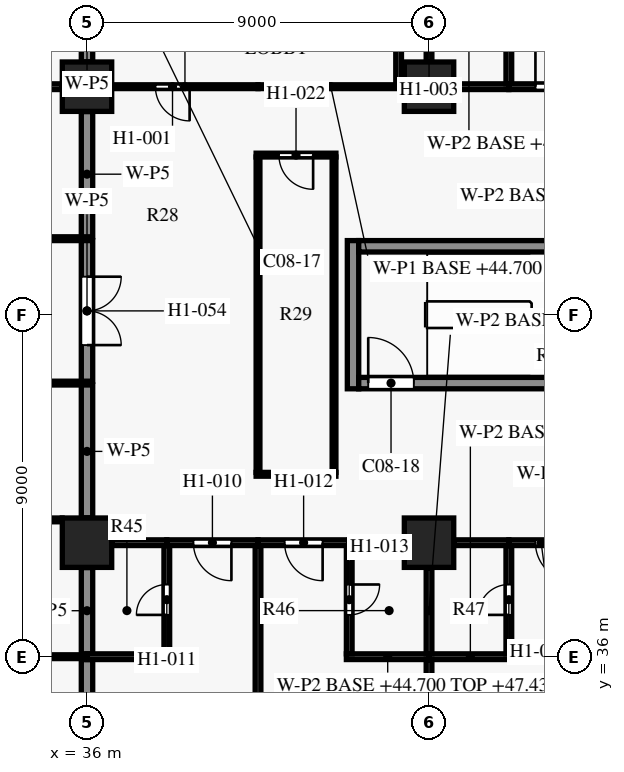
"""IFC4 building model, lengths in metres.
Left out: names, types, materials, properties, quantities, classifications, styles, units other than length and angle.
Written with IfcOpenShell. Run it as: python <this file> out.ifc"""

import sys

from ifc_helpers import new_model, si_unit, direction, frame, frame_2d, origin, origin_2d, place, context, subcontext, project, spatial, rectangle, extrude, element, fill, save


model = new_model("IFC4")
c1 = context("Model", 3, precision=1e-05, world=origin(), true_north=direction((0.0, 1.0)))
c2 = subcontext(c1, "Body", "Model", "MODEL_VIEW")
j1 = project(units=[si_unit("LENGTHUNIT", "METRE"), si_unit("PLANEANGLEUNIT", "RADIAN")], contexts=[c1])
p1 = place(None, origin())
s1 = spatial("IfcSite", under=j1, at=p1, CompositionType="ELEMENT")
p2 = place(p1, origin())
s2 = spatial("IfcBuilding", under=s1, at=p2, CompositionType="ELEMENT")
p3 = place(p2, frame((0.0, 0.0, 44.7)))
s3 = spatial("IfcBuildingStorey", under=s2, at=p3, CompositionType="ELEMENT", Elevation=44.7)
for number, where, z_axis, x_axis in (
    (1, (36.0, 39.0, 0.0), (0.0, 0.0, 1.0), (1.0, 0.0, 0.0)),
    (2, (36.0, 51.0, 0.0), (0.0, 0.0, 1.0), (1.0, 0.0, 0.0)),
    (3, (45.0, 39.0, 0.0), (0.0, 0.0, 1.0), (1.0, 0.0, 0.0)),
    (4, (45.0, 51.0, 0.0), (0.0, 0.0, 1.0), (1.0, 0.0, 0.0)),
):
    element("IfcColumn", number, at=place(p3, frame(where, z_axis=z_axis, x_axis=x_axis)), inside=s3, PredefinedType="COLUMN", context=c2, shape_type="SweptSolid", body=[
        extrude(rectangle(XDim=1.3, YDim=1.3, at=origin_2d()), origin(), (0.0, 0.0, 1.0), 3.6),
    ])
p4 = place(p3, frame((43.15, 43.2, 0.0), z_axis=(0.0, 0.0, 1.0), x_axis=(1.0, 0.0, 0.0)))
e5 = element("IfcWall", 5, at=p4, inside=s3, PredefinedType="SHEAR", context=c2, shape_type="SweptSolid", body=[
    extrude(rectangle(XDim=7.7, YDim=0.3, at=frame_2d((3.85, 0.0))), origin(), (0.0, 0.0, 1.0), 3.3),
])
p5 = place(p4, frame((0.25, 0.0, 0.0)))
e6 = element("IfcOpeningElement", 6, at=p5, cuts=e5, PredefinedType="OPENING", context=c2, shape_type="SweptSolid", body=[
    extrude(rectangle(XDim=1.2, YDim=2.2, at=frame_2d((0.6, 1.1))), frame((0.0, 0.16, 0.0), z_axis=(0.0, -1.0, 0.0), x_axis=(1.0, 0.0, 0.0)), (0.0, 0.0, 1.0), 0.32),
])
p6 = place(p3, frame((43.15, 46.8, 0.0), z_axis=(0.0, 0.0, 1.0), x_axis=(1.0, 0.0, 0.0)))
e7 = element("IfcWall", 7, at=p6, inside=s3, PredefinedType="SHEAR", context=c2, shape_type="SweptSolid", body=[
    extrude(rectangle(XDim=7.7, YDim=0.3, at=frame_2d((3.85, 0.0))), origin(), (0.0, 0.0, 1.0), 3.3),
])
p7 = place(p3, frame((43.0, 43.05, 0.0), z_axis=(0.0, 0.0, 1.0), x_axis=(0.0, 1.0, 0.0)))
e8 = element("IfcWall", 8, at=p7, inside=s3, PredefinedType="SHEAR", context=c2, shape_type="SweptSolid", body=[
    extrude(rectangle(XDim=3.9, YDim=0.3, at=frame_2d((1.95, 0.0))), origin(), (0.0, 0.0, 1.0), 3.3),
])
p8 = place(p3, frame((36.0, 35.925, 0.0), z_axis=(0.0, 0.0, 1.0), x_axis=(0.0, -1.0, 0.0)))
e9 = element("IfcWall", 9, at=p8, inside=s3, PredefinedType="PARTITIONING", context=c2, shape_type="SweptSolid", body=[
    extrude(rectangle(XDim=7.9, YDim=0.3, at=frame_2d((3.95, 0.0))), origin(), (0.0, 0.0, 1.0), 2.58),
])
p9 = place(p3, frame((45.0, 35.925, 0.0), z_axis=(0.0, 0.0, 1.0), x_axis=(0.0, -1.0, 0.0)))
e10 = element("IfcWall", 10, at=p9, inside=s3, PredefinedType="PARTITIONING", context=c2, shape_type="SweptSolid", body=[
    extrude(rectangle(XDim=8.8, YDim=0.15, at=frame_2d((4.4, 0.0))), origin(), (0.0, 0.0, 1.0), 2.73),
])
p10 = place(p3, frame((36.0, 36.0, 0.0), z_axis=(0.0, 0.0, 1.0), x_axis=(-1.0, 0.0, 0.0)))
e11 = element("IfcWall", 11, at=p10, inside=s3, PredefinedType="PARTITIONING", context=c2, shape_type="SweptSolid", body=[
    extrude(rectangle(XDim=6.55, YDim=0.1, at=frame_2d((3.275, 0.0))), origin(), (0.0, 0.0, 1.0), 2.58),
])
p11 = place(p3, frame((36.0, 36.0, 0.0), z_axis=(0.0, 0.0, 1.0), x_axis=(1.0, 0.0, 0.0)))
e12 = element("IfcWall", 12, at=p11, inside=s3, PredefinedType="PARTITIONING", context=c2, shape_type="SweptSolid", body=[
    extrude(rectangle(XDim=2.175, YDim=0.15, at=frame_2d((1.087, 0.0))), origin(), (0.0, 0.0, 1.0), 2.58),
])
for number, where, z_axis, x_axis in (
    (13, (42.825, 36.0, 0.0), (0.0, 0.0, 1.0), (1.0, 0.0, 0.0)),
    (14, (45.0, 36.0, 0.0), (0.0, 0.0, 1.0), (1.0, 0.0, 0.0)),
):
    element("IfcWall", number, at=place(p3, frame(where, z_axis=z_axis, x_axis=x_axis)), inside=s3, PredefinedType="PARTITIONING", context=c2, shape_type="SweptSolid", body=[
        extrude(rectangle(XDim=2.175, YDim=0.15, at=frame_2d((1.087, 0.0))), origin(), (0.0, 0.0, 1.0), 2.73),
    ])
p12 = place(p3, frame((38.1, 36.075, 0.0), z_axis=(0.0, 0.0, 1.0), x_axis=(0.0, 1.0, 0.0)))
e15 = element("IfcWall", 15, at=p12, inside=s3, PredefinedType="PARTITIONING", context=c2, shape_type="SweptSolid", body=[
    extrude(rectangle(XDim=2.85, YDim=0.15, at=frame_2d((1.425, 0.0))), origin(), (0.0, 0.0, 1.0), 2.58),
])
p13 = place(p12, frame((1.025, 0.0, 0.0)))
e16 = element("IfcOpeningElement", 16, at=p13, cuts=e15, PredefinedType="OPENING", context=c2, shape_type="SweptSolid", body=[
    extrude(rectangle(XDim=0.8, YDim=2.1, at=frame_2d((0.4, 1.05))), frame((0.0, 0.085, 0.0), z_axis=(0.0, -1.0, 0.0), x_axis=(1.0, 0.0, 0.0)), (0.0, 0.0, 1.0), 0.17),
])
p14 = place(p3, frame((47.1, 36.075, 0.0), z_axis=(0.0, 0.0, 1.0), x_axis=(0.0, 1.0, 0.0)))
e17 = element("IfcWall", 17, at=p14, inside=s3, PredefinedType="PARTITIONING", context=c2, shape_type="SweptSolid", body=[
    extrude(rectangle(XDim=2.85, YDim=0.15, at=frame_2d((1.425, 0.0))), origin(), (0.0, 0.0, 1.0), 2.58),
])
p15 = place(p14, frame((1.025, 0.0, 0.0)))
e18 = element("IfcOpeningElement", 18, at=p15, cuts=e17, PredefinedType="OPENING", context=c2, shape_type="SweptSolid", body=[
    extrude(rectangle(XDim=0.8, YDim=2.1, at=frame_2d((0.4, 1.05))), frame((0.0, 0.085, 0.0), z_axis=(0.0, -1.0, 0.0), x_axis=(1.0, 0.0, 0.0)), (0.0, 0.0, 1.0), 0.17),
])
p16 = place(p3, frame((36.0, 38.345, 0.0), z_axis=(0.0, 0.0, 1.0), x_axis=(0.0, -1.0, 0.0)))
e19 = element("IfcWall", 19, at=p16, inside=s3, PredefinedType="PARTITIONING", context=c2, shape_type="SweptSolid", body=[
    extrude(rectangle(XDim=2.27, YDim=0.3, at=frame_2d((1.135, 0.0))), origin(), (0.0, 0.0, 1.0), 2.58),
])
p17 = place(p3, frame((45.0, 38.345, 0.0), z_axis=(0.0, 0.0, 1.0), x_axis=(0.0, -1.0, 0.0)))
e20 = element("IfcWall", 20, at=p17, inside=s3, PredefinedType="PARTITIONING", context=c2, shape_type="SweptSolid", body=[
    extrude(rectangle(XDim=2.27, YDim=0.15, at=frame_2d((1.135, 0.0))), origin(), (0.0, 0.0, 1.0), 2.73),
])
p18 = place(p3, frame((40.5, 38.925, 0.0), z_axis=(0.0, 0.0, 1.0), x_axis=(0.0, -1.0, 0.0)))
e21 = element("IfcWall", 21, at=p18, inside=s3, PredefinedType="PARTITIONING", context=c2, shape_type="SweptSolid", body=[
    extrude(rectangle(XDim=11.35, YDim=0.15, at=frame_2d((5.675, 0.0))), origin(), (0.0, 0.0, 1.0), 2.58),
])
p19 = place(p3, frame((42.9, 38.925, 0.0), z_axis=(0.0, 0.0, 1.0), x_axis=(0.0, -1.0, 0.0)))
e22 = element("IfcWall", 22, at=p19, inside=s3, PredefinedType="PARTITIONING", context=c2, shape_type="SweptSolid", body=[
    extrude(rectangle(XDim=2.85, YDim=0.15, at=frame_2d((1.425, 0.0))), origin(), (0.0, 0.0, 1.0), 2.58),
])
p20 = place(p19, frame((1.025, 0.0, 0.0)))
e23 = element("IfcOpeningElement", 23, at=p20, cuts=e22, PredefinedType="OPENING", context=c2, shape_type="SweptSolid", body=[
    extrude(rectangle(XDim=0.8, YDim=2.1, at=frame_2d((0.4, 1.05))), frame((0.0, 0.085, 0.0), z_axis=(0.0, -1.0, 0.0), x_axis=(1.0, 0.0, 0.0)), (0.0, 0.0, 1.0), 0.17),
])
p21 = place(p3, frame((38.1, 39.0, 0.0), z_axis=(0.0, 0.0, 1.0), x_axis=(-1.0, 0.0, 0.0)))
e24 = element("IfcWall", 24, at=p21, inside=s3, PredefinedType="PARTITIONING", context=c2, shape_type="SweptSolid", body=[
    extrude(rectangle(XDim=1.445, YDim=0.15, at=frame_2d((0.723, 0.0))), origin(), (0.0, 0.0, 1.0), 2.58),
])
p22 = place(p3, frame((40.5, 39.0, 0.0), z_axis=(0.0, 0.0, 1.0), x_axis=(-1.0, 0.0, 0.0)))
e25 = element("IfcWall", 25, at=p22, inside=s3, PredefinedType="PARTITIONING", context=c2, shape_type="SweptSolid", body=[
    extrude(rectangle(XDim=2.4, YDim=0.15, at=frame_2d((1.2, 0.0))), origin(), (0.0, 0.0, 1.0), 2.58),
])
p23 = place(p22, frame((0.7, 0.0, 0.0)))
e26 = element("IfcOpeningElement", 26, at=p23, cuts=e25, PredefinedType="OPENING", context=c2, shape_type="SweptSolid", body=[
    extrude(rectangle(XDim=1.0, YDim=2.1, at=frame_2d((0.5, 1.05))), frame((0.0, 0.085, 0.0), z_axis=(0.0, -1.0, 0.0), x_axis=(1.0, 0.0, 0.0)), (0.0, 0.0, 1.0), 0.17),
])
p24 = place(p3, frame((42.9, 39.0, 0.0), z_axis=(0.0, 0.0, 1.0), x_axis=(-1.0, 0.0, 0.0)))
e27 = element("IfcWall", 27, at=p24, inside=s3, PredefinedType="PARTITIONING", context=c2, shape_type="SweptSolid", body=[
    extrude(rectangle(XDim=2.4, YDim=0.15, at=frame_2d((1.2, 0.0))), origin(), (0.0, 0.0, 1.0), 2.58),
])
p25 = place(p24, frame((0.7, 0.0, 0.0)))
e28 = element("IfcOpeningElement", 28, at=p25, cuts=e27, PredefinedType="OPENING", context=c2, shape_type="SweptSolid", body=[
    extrude(rectangle(XDim=1.0, YDim=2.1, at=frame_2d((0.5, 1.05))), frame((0.0, 0.085, 0.0), z_axis=(0.0, -1.0, 0.0), x_axis=(1.0, 0.0, 0.0)), (0.0, 0.0, 1.0), 0.17),
])
for number, where, z_axis, x_axis in (
    (29, (44.345, 39.0, 0.0), (0.0, 0.0, 1.0), (-1.0, 0.0, 0.0)),
    (30, (47.1, 39.0, 0.0), (0.0, 0.0, 1.0), (-1.0, 0.0, 0.0)),
):
    element("IfcWall", number, at=place(p3, frame(where, z_axis=z_axis, x_axis=x_axis)), inside=s3, PredefinedType="PARTITIONING", context=c2, shape_type="SweptSolid", body=[
        extrude(rectangle(XDim=1.445, YDim=0.15, at=frame_2d((0.723, 0.0))), origin(), (0.0, 0.0, 1.0), 2.58),
    ])
p26 = place(p3, frame((49.5, 39.0, 0.0), z_axis=(0.0, 0.0, 1.0), x_axis=(-1.0, 0.0, 0.0)))
e31 = element("IfcWall", 31, at=p26, inside=s3, PredefinedType="PARTITIONING", context=c2, shape_type="SweptSolid", body=[
    extrude(rectangle(XDim=2.4, YDim=0.15, at=frame_2d((1.2, 0.0))), origin(), (0.0, 0.0, 1.0), 2.58),
])
p27 = place(p26, frame((0.7, 0.0, 0.0)))
e32 = element("IfcOpeningElement", 32, at=p27, cuts=e31, PredefinedType="OPENING", context=c2, shape_type="SweptSolid", body=[
    extrude(rectangle(XDim=1.0, YDim=2.1, at=frame_2d((0.5, 1.05))), frame((0.0, 0.085, 0.0), z_axis=(0.0, -1.0, 0.0), x_axis=(1.0, 0.0, 0.0)), (0.0, 0.0, 1.0), 0.17),
])
p28 = place(p3, frame((35.345, 39.6, 0.0), z_axis=(0.0, 0.0, 1.0), x_axis=(-1.0, 0.0, 0.0)))
e33 = element("IfcWall", 33, at=p28, inside=s3, PredefinedType="PARTITIONING", context=c2, shape_type="SweptSolid", body=[
    extrude(rectangle(XDim=5.895, YDim=0.1, at=frame_2d((2.948, 0.0))), origin(), (0.0, 0.0, 1.0), 3.28),
])
p29 = place(p3, frame((40.45, 40.8, 0.0), z_axis=(0.0, 0.0, 1.0), x_axis=(1.0, 0.0, 0.0)))
e34 = element("IfcWall", 34, at=p29, inside=s3, PredefinedType="PARTITIONING", context=c2, shape_type="SweptSolid", body=[
    extrude(rectangle(XDim=2.1, YDim=0.1, at=frame_2d((1.05, 0.0))), origin(), (0.0, 0.0, 1.0), 3.28),
])
p30 = place(p3, frame((36.0, 43.15, 0.0), z_axis=(0.0, 0.0, 1.0), x_axis=(0.0, -1.0, 0.0)))
e35 = element("IfcWall", 35, at=p30, inside=s3, PredefinedType="PARTITIONING", context=c2, shape_type="SweptSolid", body=[
    extrude(rectangle(XDim=3.495, YDim=0.3, at=frame_2d((1.748, 0.0))), origin(), (0.0, 0.0, 1.0), 2.58),
])
p31 = place(p3, frame((35.85, 43.2, 0.0), z_axis=(0.0, 0.0, 1.0), x_axis=(-1.0, 0.0, 0.0)))
e36 = element("IfcWall", 36, at=p31, inside=s3, PredefinedType="PARTITIONING", context=c2, shape_type="SweptSolid", body=[
    extrude(rectangle(XDim=6.5, YDim=0.1, at=frame_2d((3.25, 0.0))), origin(), (0.0, 0.0, 1.0), 3.28),
])
p32 = place(p31, frame((2.7, 0.0, 0.0)))
e37 = element("IfcOpeningElement", 37, at=p32, cuts=e36, PredefinedType="OPENING", context=c2, shape_type="SweptSolid", body=[
    extrude(rectangle(XDim=0.9, YDim=2.1, at=frame_2d((0.45, 1.05))), frame((0.0, 0.06, 0.0), z_axis=(0.0, -1.0, 0.0), x_axis=(1.0, 0.0, 0.0)), (0.0, 0.0, 1.0), 0.12),
])
p33 = place(p3, frame((36.0, 46.95, 0.0), z_axis=(0.0, 0.0, 1.0), x_axis=(0.0, -1.0, 0.0)))
e38 = element("IfcWall", 38, at=p33, inside=s3, PredefinedType="PARTITIONING", context=c2, shape_type="SweptSolid", body=[
    extrude(rectangle(XDim=3.7, YDim=0.3, at=frame_2d((1.85, 0.0))), origin(), (0.0, 0.0, 1.0), 2.58),
])
p34 = place(p33, frame((0.95, 0.0, 0.0)))
e39 = element("IfcOpeningElement", 39, at=p34, cuts=e38, PredefinedType="OPENING", context=c2, shape_type="SweptSolid", body=[
    extrude(rectangle(XDim=1.8, YDim=2.1, at=frame_2d((0.9, 1.05))), frame((0.0, 0.16, 0.0), z_axis=(0.0, -1.0, 0.0), x_axis=(1.0, 0.0, 0.0)), (0.0, 0.0, 1.0), 0.32),
])
p35 = place(p3, frame((31.5, 47.0, 0.0), z_axis=(0.0, 0.0, 1.0), x_axis=(1.0, 0.0, 0.0)))
e40 = element("IfcWall", 40, at=p35, inside=s3, PredefinedType="PARTITIONING", context=c2, shape_type="SweptSolid", body=[
    extrude(rectangle(XDim=4.35, YDim=0.1, at=frame_2d((2.175, 0.0))), origin(), (0.0, 0.0, 1.0), 3.28),
])
for number, where, z_axis, x_axis in (
    (41, (40.5, 49.15, 0.0), (0.0, 0.0, 1.0), (0.0, -1.0, 0.0)),
    (42, (42.5, 49.15, 0.0), (0.0, 0.0, 1.0), (0.0, -1.0, 0.0)),
):
    element("IfcWall", number, at=place(p3, frame(where, z_axis=z_axis, x_axis=x_axis)), inside=s3, PredefinedType="PARTITIONING", context=c2, shape_type="SweptSolid", body=[
        extrude(rectangle(XDim=8.3, YDim=0.1, at=frame_2d((4.15, 0.0))), origin(), (0.0, 0.0, 1.0), 3.28),
    ])
p36 = place(p3, frame((42.55, 49.2, 0.0), z_axis=(0.0, 0.0, 1.0), x_axis=(-1.0, 0.0, 0.0)))
e43 = element("IfcWall", 43, at=p36, inside=s3, PredefinedType="PARTITIONING", context=c2, shape_type="SweptSolid", body=[
    extrude(rectangle(XDim=2.1, YDim=0.1, at=frame_2d((1.05, 0.0))), origin(), (0.0, 0.0, 1.0), 3.28),
])
p37 = place(p36, frame((0.6, 0.0, 0.0)))
e44 = element("IfcOpeningElement", 44, at=p37, cuts=e43, PredefinedType="OPENING", context=c2, shape_type="SweptSolid", body=[
    extrude(rectangle(XDim=0.9, YDim=2.1, at=frame_2d((0.45, 1.05))), frame((0.0, 0.06, 0.0), z_axis=(0.0, -1.0, 0.0), x_axis=(1.0, 0.0, 0.0)), (0.0, 0.0, 1.0), 0.12),
])
p38 = place(p3, frame((36.0, 50.345, 0.0), z_axis=(0.0, 0.0, 1.0), x_axis=(0.0, -1.0, 0.0)))
e45 = element("IfcWall", 45, at=p38, inside=s3, PredefinedType="PARTITIONING", context=c2, shape_type="SweptSolid", body=[
    extrude(rectangle(XDim=3.295, YDim=0.3, at=frame_2d((1.647, 0.0))), origin(), (0.0, 0.0, 1.0), 2.58),
])
p39 = place(p3, frame((33.6, 51.0, 0.0), z_axis=(0.0, 0.0, 1.0), x_axis=(1.0, 0.0, 0.0)))
e46 = element("IfcWall", 46, at=p39, inside=s3, PredefinedType="PARTITIONING", context=c2, shape_type="SweptSolid", body=[
    extrude(rectangle(XDim=1.745, YDim=0.15, at=frame_2d((0.873, 0.0))), origin(), (0.0, 0.0, 1.0), 3.28),
])
p40 = place(p3, frame((40.5, 51.0, 0.0), z_axis=(0.0, 0.0, 1.0), x_axis=(-1.0, 0.0, 0.0)))
e47 = element("IfcWall", 47, at=p40, inside=s3, PredefinedType="PARTITIONING", context=c2, shape_type="SweptSolid", body=[
    extrude(rectangle(XDim=3.845, YDim=0.1, at=frame_2d((1.922, 0.0))), origin(), (0.0, 0.0, 1.0), 2.58),
])
p41 = place(p40, frame((1.8, 0.0, 0.0)))
e48 = element("IfcOpeningElement", 48, at=p41, cuts=e47, PredefinedType="OPENING", context=c2, shape_type="SweptSolid", body=[
    extrude(rectangle(XDim=0.9, YDim=2.1, at=frame_2d((0.45, 1.05))), frame((0.0, 0.06, 0.0), z_axis=(0.0, -1.0, 0.0), x_axis=(1.0, 0.0, 0.0)), (0.0, 0.0, 1.0), 0.12),
])
p42 = place(p3, frame((44.33, 51.0, 0.0), z_axis=(0.0, 0.0, 1.0), x_axis=(-1.0, 0.0, 0.0)))
e49 = element("IfcWall", 49, at=p42, inside=s3, PredefinedType="PARTITIONING", context=c2, shape_type="SweptSolid", body=[
    extrude(rectangle(XDim=3.83, YDim=0.1, at=frame_2d((1.915, 0.0))), origin(), (0.0, 0.0, 1.0), 2.58),
])
p43 = place(p3, frame((45.655, 51.0, 0.0), z_axis=(0.0, 0.0, 1.0), x_axis=(1.0, 0.0, 0.0)))
e50 = element("IfcWall", 50, at=p43, inside=s3, PredefinedType="PARTITIONING", context=c2, shape_type="SweptSolid", body=[
    extrude(rectangle(XDim=1.445, YDim=0.15, at=frame_2d((0.723, 0.0))), origin(), (0.0, 0.0, 1.0), 2.58),
])
p44 = place(p3, frame((47.1, 51.0, 0.0), z_axis=(0.0, 0.0, 1.0), x_axis=(1.0, 0.0, 0.0)))
e51 = element("IfcWall", 51, at=p44, inside=s3, PredefinedType="PARTITIONING", context=c2, shape_type="SweptSolid", body=[
    extrude(rectangle(XDim=2.4, YDim=0.15, at=frame_2d((1.2, 0.0))), origin(), (0.0, 0.0, 1.0), 2.58),
])
p45 = place(p44, frame((0.7, 0.0, 0.0)))
e52 = element("IfcOpeningElement", 52, at=p45, cuts=e51, PredefinedType="OPENING", context=c2, shape_type="SweptSolid", body=[
    extrude(rectangle(XDim=1.0, YDim=2.1, at=frame_2d((0.5, 1.05))), frame((0.0, 0.085, 0.0), z_axis=(0.0, -1.0, 0.0), x_axis=(1.0, 0.0, 0.0)), (0.0, 0.0, 1.0), 0.17),
])
p46 = place(p3, frame((47.1, 51.075, 0.0), z_axis=(0.0, 0.0, 1.0), x_axis=(0.0, 1.0, 0.0)))
e53 = element("IfcWall", 53, at=p46, inside=s3, PredefinedType="PARTITIONING", context=c2, shape_type="SweptSolid", body=[
    extrude(rectangle(XDim=2.85, YDim=0.15, at=frame_2d((1.425, 0.0))), origin(), (0.0, 0.0, 1.0), 2.58),
])
p47 = place(p3, frame((36.0, 53.7, 0.0), z_axis=(0.0, 0.0, 1.0), x_axis=(0.0, -1.0, 0.0)))
e54 = element("IfcWall", 54, at=p47, inside=s3, PredefinedType="PARTITIONING", context=c2, shape_type="SweptSolid", body=[
    extrude(rectangle(XDim=2.045, YDim=0.3, at=frame_2d((1.022, 0.0))), origin(), (0.0, 0.0, 1.0), 2.58),
])
p48 = place(p3, frame((44.2, 53.7, 0.0), z_axis=(0.0, 0.0, 1.0), x_axis=(0.0, -1.0, 0.0)))
e55 = element("IfcWall", 55, at=p48, inside=s3, PredefinedType="PARTITIONING", context=c2, shape_type="SweptSolid", body=[
    extrude(rectangle(XDim=2.625, YDim=0.15, at=frame_2d((1.312, 0.0))), origin(), (0.0, 0.0, 1.0), 2.58),
])
p49 = place(p3, frame((45.0, 53.925, 0.0), z_axis=(0.0, 0.0, 1.0), x_axis=(0.0, -1.0, 0.0)))
e56 = element("IfcWall", 56, at=p49, inside=s3, PredefinedType="PARTITIONING", context=c2, shape_type="SweptSolid", body=[
    extrude(rectangle(XDim=2.27, YDim=0.15, at=frame_2d((1.135, 0.0))), origin(), (0.0, 0.0, 1.0), 2.73),
])
p50 = place(p49, frame((1.025, 0.0, 0.0)))
e57 = element("IfcOpeningElement", 57, at=p50, cuts=e56, PredefinedType="OPENING", context=c2, shape_type="SweptSolid", body=[
    extrude(rectangle(XDim=0.8, YDim=2.1, at=frame_2d((0.4, 1.05))), frame((0.0, 0.085, 0.0), z_axis=(0.0, -1.0, 0.0), x_axis=(1.0, 0.0, 0.0)), (0.0, 0.0, 1.0), 0.17),
])
p51 = place(p5, origin())
e58 = element("IfcDoor", 58, at=p51, inside=s3, OperationType="SINGLE_SWING_RIGHT", PredefinedType="DOOR", context=c2, shape_type="SweptSolid", body=[
    extrude(rectangle(XDim=1.2, YDim=2.2, at=frame_2d((0.6, 1.1))), frame((0.0, 0.025, 0.0), z_axis=(0.0, -1.0, 0.0), x_axis=(1.0, 0.0, 0.0)), (0.0, 0.0, 1.0), 0.05),
])
fill(e6, e58)
p52 = place(p41, origin())
e59 = element("IfcDoor", 59, at=p52, inside=s3, OperationType="SINGLE_SWING_LEFT", PredefinedType="DOOR", context=c2, shape_type="SweptSolid", body=[
    extrude(rectangle(XDim=0.9, YDim=2.1, at=frame_2d((0.45, 1.05))), frame((0.0, 0.025, 0.0), z_axis=(0.0, -1.0, 0.0), x_axis=(1.0, 0.0, 0.0)), (0.0, 0.0, 1.0), 0.05),
])
fill(e48, e59)
p53 = place(p45, origin())
e60 = element("IfcDoor", 60, at=p53, inside=s3, OperationType="SINGLE_SWING_LEFT", PredefinedType="DOOR", context=c2, shape_type="SweptSolid", body=[
    extrude(rectangle(XDim=1.0, YDim=2.1, at=frame_2d((0.5, 1.05))), frame((0.0, 0.025, 0.0), z_axis=(0.0, -1.0, 0.0), x_axis=(1.0, 0.0, 0.0)), (0.0, 0.0, 1.0), 0.05),
])
fill(e52, e60)
p54 = place(p23, origin())
e61 = element("IfcDoor", 61, at=p54, inside=s3, OperationType="SINGLE_SWING_LEFT", PredefinedType="DOOR", context=c2, shape_type="SweptSolid", body=[
    extrude(rectangle(XDim=1.0, YDim=2.1, at=frame_2d((0.5, 1.05))), frame((0.0, 0.025, 0.0), z_axis=(0.0, -1.0, 0.0), x_axis=(1.0, 0.0, 0.0)), (0.0, 0.0, 1.0), 0.05),
])
fill(e26, e61)
p55 = place(p13, origin())
e62 = element("IfcDoor", 62, at=p55, inside=s3, OperationType="SINGLE_SWING_LEFT", PredefinedType="DOOR", context=c2, shape_type="SweptSolid", body=[
    extrude(rectangle(XDim=0.8, YDim=2.1, at=frame_2d((0.4, 1.05))), frame((0.0, 0.025, 0.0), z_axis=(0.0, -1.0, 0.0), x_axis=(1.0, 0.0, 0.0)), (0.0, 0.0, 1.0), 0.05),
])
fill(e16, e62)
p56 = place(p25, origin())
e63 = element("IfcDoor", 63, at=p56, inside=s3, OperationType="SINGLE_SWING_LEFT", PredefinedType="DOOR", context=c2, shape_type="SweptSolid", body=[
    extrude(rectangle(XDim=1.0, YDim=2.1, at=frame_2d((0.5, 1.05))), frame((0.0, 0.025, 0.0), z_axis=(0.0, -1.0, 0.0), x_axis=(1.0, 0.0, 0.0)), (0.0, 0.0, 1.0), 0.05),
])
fill(e28, e63)
p57 = place(p20, origin())
e64 = element("IfcDoor", 64, at=p57, inside=s3, OperationType="SINGLE_SWING_LEFT", PredefinedType="DOOR", context=c2, shape_type="SweptSolid", body=[
    extrude(rectangle(XDim=0.8, YDim=2.1, at=frame_2d((0.4, 1.05))), frame((0.0, 0.025, 0.0), z_axis=(0.0, -1.0, 0.0), x_axis=(1.0, 0.0, 0.0)), (0.0, 0.0, 1.0), 0.05),
])
fill(e23, e64)
p58 = place(p27, origin())
e65 = element("IfcDoor", 65, at=p58, inside=s3, OperationType="SINGLE_SWING_LEFT", PredefinedType="DOOR", context=c2, shape_type="SweptSolid", body=[
    extrude(rectangle(XDim=1.0, YDim=2.1, at=frame_2d((0.5, 1.05))), frame((0.0, 0.025, 0.0), z_axis=(0.0, -1.0, 0.0), x_axis=(1.0, 0.0, 0.0)), (0.0, 0.0, 1.0), 0.05),
])
fill(e32, e65)
p59 = place(p15, origin())
e66 = element("IfcDoor", 66, at=p59, inside=s3, OperationType="SINGLE_SWING_LEFT", PredefinedType="DOOR", context=c2, shape_type="SweptSolid", body=[
    extrude(rectangle(XDim=0.8, YDim=2.1, at=frame_2d((0.4, 1.05))), frame((0.0, 0.025, 0.0), z_axis=(0.0, -1.0, 0.0), x_axis=(1.0, 0.0, 0.0)), (0.0, 0.0, 1.0), 0.05),
])
fill(e18, e66)
p60 = place(p37, origin())
e67 = element("IfcDoor", 67, at=p60, inside=s3, OperationType="SINGLE_SWING_LEFT", PredefinedType="DOOR", context=c2, shape_type="SweptSolid", body=[
    extrude(rectangle(XDim=0.9, YDim=2.1, at=frame_2d((0.45, 1.05))), frame((0.0, 0.025, 0.0), z_axis=(0.0, -1.0, 0.0), x_axis=(1.0, 0.0, 0.0)), (0.0, 0.0, 1.0), 0.05),
])
fill(e44, e67)
p61 = place(p34, origin())
e68 = element("IfcDoor", 68, at=p61, inside=s3, OperationType="DOUBLE_DOOR_SINGLE_SWING", PredefinedType="DOOR", context=c2, shape_type="SweptSolid", body=[
    extrude(rectangle(XDim=1.8, YDim=2.1, at=frame_2d((0.9, 1.05))), frame((0.0, 0.025, 0.0), z_axis=(0.0, -1.0, 0.0), x_axis=(1.0, 0.0, 0.0)), (0.0, 0.0, 1.0), 0.05),
])
fill(e39, e68)
save(model, sys.argv[1])
